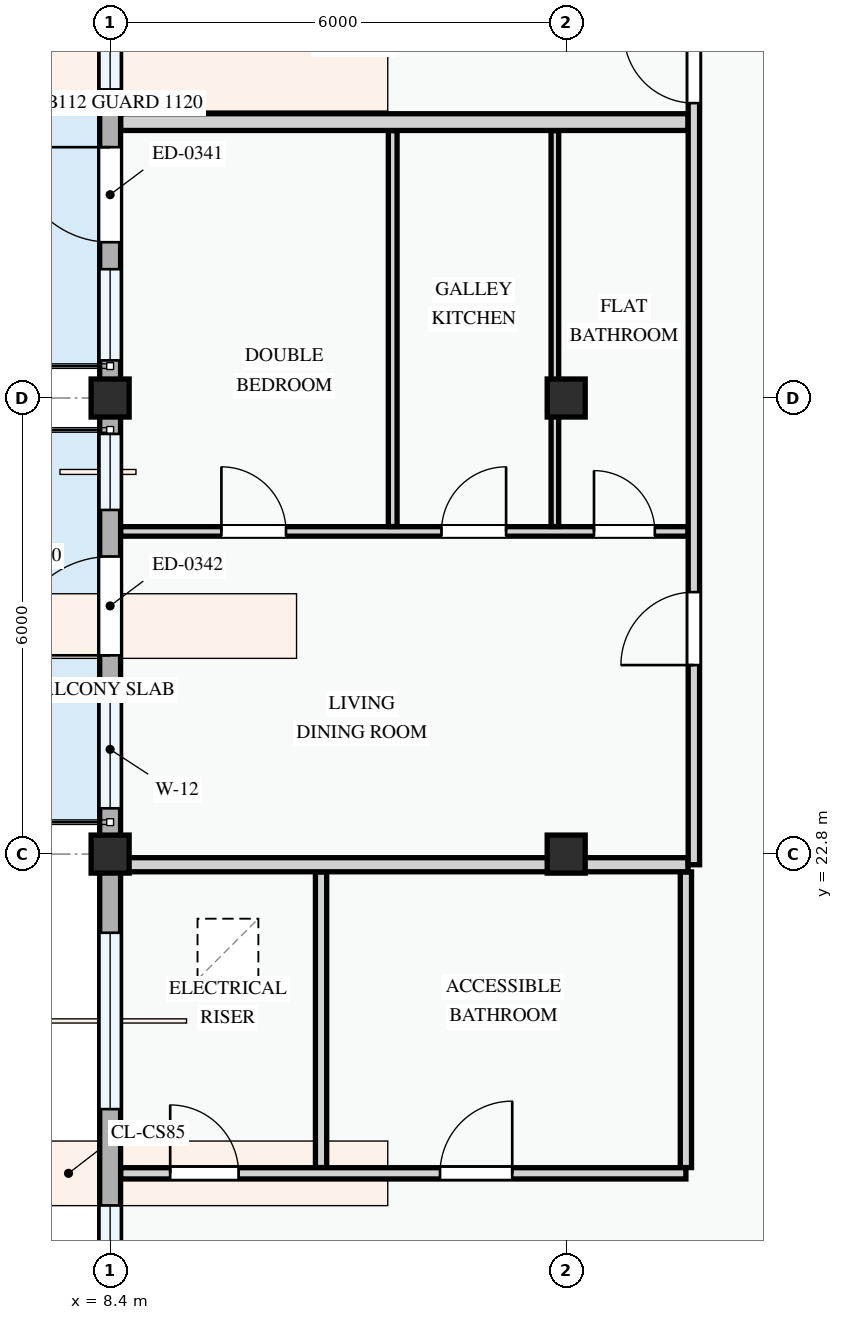
"""IFC4 building model, lengths in metres.
Left out: names, types, materials, properties, quantities, classifications, styles, units other than length and angle.
Written with IfcOpenShell. Run it as: python <this file> out.ifc"""

import sys

from ifc_helpers import new_model, si_unit, direction, frame, frame_2d, origin, origin_2d, place, context, subcontext, project, spatial, rectangle, extrude, element, fill, save


model = new_model("IFC4")
c1 = context("Model", 3, precision=1e-05, world=origin(), true_north=direction((0.0, 1.0)))
c2 = subcontext(c1, "Body", "Model", "MODEL_VIEW")
j1 = project(units=[si_unit("LENGTHUNIT", "METRE"), si_unit("PLANEANGLEUNIT", "RADIAN")], contexts=[c1])
p1 = place(None, origin())
s1 = spatial("IfcSite", under=j1, at=p1, CompositionType="ELEMENT")
p2 = place(p1, origin())
s2 = spatial("IfcBuilding", under=s1, at=p2, CompositionType="ELEMENT")
p3 = place(p2, frame((0.0, 0.0, 24.6)))
s3 = spatial("IfcBuildingStorey", under=s2, at=p3, CompositionType="ELEMENT", Elevation=24.6)
for number, where, z_axis, x_axis in (
    (1, (8.4, 22.8, 0.0), (0.0, 0.0, 1.0), (1.0, 0.0, 0.0)),
    (2, (8.4, 28.8, 0.0), (0.0, 0.0, 1.0), (1.0, 0.0, 0.0)),
    (3, (14.4, 22.8, 0.0), (0.0, 0.0, 1.0), (1.0, 0.0, 0.0)),
    (4, (14.4, 28.8, 0.0), (0.0, 0.0, 1.0), (1.0, 0.0, 0.0)),
):
    element("IfcColumn", number, at=place(p3, frame(where, z_axis=z_axis, x_axis=x_axis)), inside=s3, PredefinedType="COLUMN", context=c2, shape_type="SweptSolid", body=[
        extrude(rectangle(XDim=0.5, YDim=0.5, at=origin_2d()), origin(), (0.0, 0.0, 1.0), 3.3),
    ])
p4 = place(p3, frame((8.4, 37.2, 0.0), z_axis=(0.0, 0.0, 1.0), x_axis=(0.0, -1.0, 0.0)))
e5 = element("IfcWall", 5, at=p4, inside=s3, PredefinedType="STANDARD", context=c2, shape_type="SweptSolid", body=[
    extrude(rectangle(XDim=8.4, YDim=0.275, at=frame_2d((4.2, 0.0))), origin(), (0.0, 0.0, 1.0), 2.425),
])
p5 = place(p4, frame((5.1, 0.0, 0.0)))
e6 = element("IfcOpeningElement", 6, at=p5, cuts=e5, PredefinedType="OPENING", context=c2, shape_type="SweptSolid", body=[
    extrude(rectangle(XDim=1.25, YDim=2.2, at=frame_2d((0.625, 1.1))), frame((0.0, 0.147, 0.0), z_axis=(0.0, -1.0, 0.0), x_axis=(1.0, 0.0, 0.0)), (0.0, 0.0, 1.0), 0.295),
])
p6 = place(p4, frame((0.54, 0.0, 0.78)))
e7 = element("IfcOpeningElement", 7, at=p6, cuts=e5, PredefinedType="OPENING", context=c2, shape_type="SweptSolid", body=[
    extrude(rectangle(XDim=0.9, YDim=1.2, at=frame_2d((0.45, 0.6))), frame((0.0, 0.147, 0.0), z_axis=(0.0, -1.0, 0.0), x_axis=(1.0, 0.0, 0.0)), (0.0, 0.0, 1.0), 0.295),
])
p7 = place(p4, frame((2.22, 0.0, 0.78)))
e8 = element("IfcOpeningElement", 8, at=p7, cuts=e5, PredefinedType="OPENING", context=c2, shape_type="SweptSolid", body=[
    extrude(rectangle(XDim=2.12, YDim=1.44, at=frame_2d((1.06, 0.72))), frame((0.0, 0.147, 0.0), z_axis=(0.0, -1.0, 0.0), x_axis=(1.0, 0.0, 0.0)), (0.0, 0.0, 1.0), 0.295),
])
p8 = place(p4, frame((6.705, 0.0, 0.78)))
e9 = element("IfcOpeningElement", 9, at=p8, cuts=e5, PredefinedType="OPENING", context=c2, shape_type="SweptSolid", body=[
    extrude(rectangle(XDim=1.2, YDim=1.5, at=frame_2d((0.6, 0.75))), frame((0.0, 0.147, 0.0), z_axis=(0.0, -1.0, 0.0), x_axis=(1.0, 0.0, 0.0)), (0.0, 0.0, 1.0), 0.295),
])
p9 = place(p3, frame((8.4, 28.8, 0.0), z_axis=(0.0, 0.0, 1.0), x_axis=(0.0, -1.0, 0.0)))
e10 = element("IfcWall", 10, at=p9, inside=s3, PredefinedType="STANDARD", context=c2, shape_type="SweptSolid", body=[
    extrude(rectangle(XDim=6.0, YDim=0.275, at=frame_2d((3.0, 0.0))), origin(), (0.0, 0.0, 1.0), 2.575),
])
p10 = place(p9, frame((2.085, 0.0, 0.0)))
e11 = element("IfcOpeningElement", 11, at=p10, cuts=e10, PredefinedType="OPENING", context=c2, shape_type="SweptSolid", body=[
    extrude(rectangle(XDim=1.3, YDim=2.15, at=frame_2d((0.65, 1.075))), frame((0.0, 0.147, 0.0), z_axis=(0.0, -1.0, 0.0), x_axis=(1.0, 0.0, 0.0)), (0.0, 0.0, 1.0), 0.295),
])
p11 = place(p9, frame((0.472, 0.0, 0.78)))
e12 = element("IfcOpeningElement", 12, at=p11, cuts=e10, PredefinedType="OPENING", context=c2, shape_type="SweptSolid", body=[
    extrude(rectangle(XDim=1.0, YDim=1.25, at=frame_2d((0.5, 0.625))), frame((0.0, 0.147, 0.0), z_axis=(0.0, -1.0, 0.0), x_axis=(1.0, 0.0, 0.0)), (0.0, 0.0, 1.0), 0.295),
])
p12 = place(p9, frame((3.847, 0.0, 0.78)))
e13 = element("IfcOpeningElement", 13, at=p12, cuts=e10, PredefinedType="OPENING", context=c2, shape_type="SweptSolid", body=[
    extrude(rectangle(XDim=1.55, YDim=1.4, at=frame_2d((0.775, 0.7))), frame((0.0, 0.147, 0.0), z_axis=(0.0, -1.0, 0.0), x_axis=(1.0, 0.0, 0.0)), (0.0, 0.0, 1.0), 0.295),
])
p13 = place(p3, frame((8.4, 22.8, 0.0), z_axis=(0.0, 0.0, 1.0), x_axis=(0.0, -1.0, 0.0)))
e14 = element("IfcWall", 14, at=p13, inside=s3, PredefinedType="STANDARD", context=c2, shape_type="SweptSolid", body=[
    extrude(rectangle(XDim=8.4, YDim=0.275, at=frame_2d((4.2, 0.0))), origin(), (0.0, 0.0, 1.0), 2.425),
])
p14 = place(p13, frame((1.035, 0.0, 0.78)))
e15 = element("IfcOpeningElement", 15, at=p14, cuts=e14, PredefinedType="OPENING", context=c2, shape_type="SweptSolid", body=[
    extrude(rectangle(XDim=2.32, YDim=1.5, at=frame_2d((1.16, 0.75))), frame((0.0, 0.147, 0.0), z_axis=(0.0, -1.0, 0.0), x_axis=(1.0, 0.0, 0.0)), (0.0, 0.0, 1.0), 0.295),
])
p15 = place(p13, frame((4.623, 0.0, 0.78)))
e16 = element("IfcOpeningElement", 16, at=p15, cuts=e14, PredefinedType="OPENING", context=c2, shape_type="SweptSolid", body=[
    extrude(rectangle(XDim=2.08, YDim=1.52, at=frame_2d((1.04, 0.76))), frame((0.0, 0.147, 0.0), z_axis=(0.0, -1.0, 0.0), x_axis=(1.0, 0.0, 0.0)), (0.0, 0.0, 1.0), 0.295),
])
for number, where, z_axis, x_axis in (
    (17, (11.175, 18.676, 0.0), (0.0, 0.0, 1.0), (0.0, 1.0, 0.0)),
    (18, (15.975, 18.676, 0.0), (0.0, 0.0, 1.0), (0.0, 1.0, 0.0)),
):
    element("IfcWall", number, at=place(p3, frame(where, z_axis=z_axis, x_axis=x_axis)), inside=s3, PredefinedType="PARTITIONING", context=c2, shape_type="SweptSolid", body=[
        extrude(rectangle(XDim=3.889, YDim=0.148, at=frame_2d((1.945, 0.0))), origin(), (0.0, 0.0, 1.0), 3.0),
    ])
p16 = place(p3, frame((8.54, 18.6, 0.0), z_axis=(0.0, 0.0, 1.0), x_axis=(1.0, 0.0, 0.0)))
e19 = element("IfcWall", 19, at=p16, inside=s3, PredefinedType="PARTITIONING", context=c2, shape_type="SweptSolid", body=[
    extrude(rectangle(XDim=7.435, YDim=0.148, at=frame_2d((3.718, 0.0))), origin(), (0.0, 0.0, 1.0), 3.0),
])
p17 = place(p16, frame((0.65, 0.0, 0.0)))
e20 = element("IfcOpeningElement", 20, at=p17, cuts=e19, PredefinedType="OPENING", context=c2, shape_type="SweptSolid", body=[
    extrude(rectangle(XDim=0.9, YDim=2.1, at=frame_2d((0.45, 1.05))), frame((0.0, 0.084, 0.0), z_axis=(0.0, -1.0, 0.0), x_axis=(1.0, 0.0, 0.0)), (0.0, 0.0, 1.0), 0.168),
])
p18 = place(p16, frame((4.2, 0.0, 0.0)))
e21 = element("IfcOpeningElement", 21, at=p18, cuts=e19, PredefinedType="OPENING", context=c2, shape_type="SweptSolid", body=[
    extrude(rectangle(XDim=0.95, YDim=2.1, at=frame_2d((0.475, 1.05))), frame((0.0, 0.084, 0.0), z_axis=(0.0, -1.0, 0.0), x_axis=(1.0, 0.0, 0.0)), (0.0, 0.0, 1.0), 0.168),
])
p19 = place(p3, frame((8.54, 27.045, 0.0), z_axis=(0.0, 0.0, 1.0), x_axis=(1.0, 0.0, 0.0)))
e22 = element("IfcWall", 22, at=p19, inside=s3, PredefinedType="PARTITIONING", context=c2, shape_type="SweptSolid", body=[
    extrude(rectangle(XDim=7.463, YDim=0.125, at=frame_2d((3.732, 0.0))), origin(), (0.0, 0.0, 1.0), 3.0),
])
p20 = place(p19, frame((1.324, 0.0, 0.0)))
e23 = element("IfcOpeningElement", 23, at=p20, cuts=e22, PredefinedType="OPENING", context=c2, shape_type="SweptSolid", body=[
    extrude(rectangle(XDim=0.85, YDim=2.1, at=frame_2d((0.425, 1.05))), frame((0.0, 0.073, 0.0), z_axis=(0.0, -1.0, 0.0), x_axis=(1.0, 0.0, 0.0)), (0.0, 0.0, 1.0), 0.145),
])
p21 = place(p19, frame((4.22, 0.0, 0.0)))
e24 = element("IfcOpeningElement", 24, at=p21, cuts=e22, PredefinedType="OPENING", context=c2, shape_type="SweptSolid", body=[
    extrude(rectangle(XDim=0.85, YDim=2.1, at=frame_2d((0.425, 1.05))), frame((0.0, 0.073, 0.0), z_axis=(0.0, -1.0, 0.0), x_axis=(1.0, 0.0, 0.0)), (0.0, 0.0, 1.0), 0.145),
])
p22 = place(p19, frame((6.226, 0.0, 0.0)))
e25 = element("IfcOpeningElement", 25, at=p22, cuts=e22, PredefinedType="OPENING", context=c2, shape_type="SweptSolid", body=[
    extrude(rectangle(XDim=0.8, YDim=2.1, at=frame_2d((0.4, 1.05))), frame((0.0, 0.073, 0.0), z_axis=(0.0, -1.0, 0.0), x_axis=(1.0, 0.0, 0.0)), (0.0, 0.0, 1.0), 0.145),
])
p23 = place(p3, frame((12.118, 27.11, 0.0), z_axis=(0.0, 0.0, 1.0), x_axis=(0.0, 1.0, 0.0)))
e26 = element("IfcWall", 26, at=p23, inside=s3, PredefinedType="PARTITIONING", context=c2, shape_type="SweptSolid", body=[
    extrude(rectangle(XDim=5.208, YDim=0.115, at=frame_2d((2.604, 0.0))), origin(), (0.0, 0.0, 1.0), 3.0),
])
p24 = place(p3, frame((14.251, 27.11, 0.0), z_axis=(0.0, 0.0, 1.0), x_axis=(0.0, 1.0, 0.0)))
e27 = element("IfcWall", 27, at=p24, inside=s3, PredefinedType="PARTITIONING", context=c2, shape_type="SweptSolid", body=[
    extrude(rectangle(XDim=5.208, YDim=0.1, at=frame_2d((2.604, 0.0))), origin(), (0.0, 0.0, 1.0), 2.425),
])
p25 = place(p3, frame((8.54, 22.66, 0.0), z_axis=(0.0, 0.0, 1.0), x_axis=(1.0, 0.0, 0.0)))
e28 = element("IfcWall", 28, at=p25, inside=s3, PredefinedType="PARTITIONING", context=c2, shape_type="SweptSolid", body=[
    extrude(rectangle(XDim=7.463, YDim=0.185, at=frame_2d((3.732, 0.0))), origin(), (0.0, 0.0, 1.0), 2.375),
])
p26 = place(p3, frame((8.54, 32.43, 0.0), z_axis=(0.0, 0.0, 1.0), x_axis=(1.0, 0.0, 0.0)))
e29 = element("IfcWall", 29, at=p26, inside=s3, PredefinedType="PARTITIONING", context=c2, shape_type="SweptSolid", body=[
    extrude(rectangle(XDim=7.463, YDim=0.22, at=frame_2d((3.732, 0.0))), origin(), (0.0, 0.0, 1.0), 3.0),
])
p27 = place(p3, frame((16.08, 22.66, 0.0), z_axis=(0.0, 0.0, 1.0), x_axis=(0.0, 1.0, 0.0)))
e30 = element("IfcWall", 30, at=p27, inside=s3, PredefinedType="PARTITIONING", context=c2, shape_type="SweptSolid", body=[
    extrude(rectangle(XDim=34.801, YDim=0.15, at=frame_2d((17.4, 0.0))), origin(), (0.0, 0.0, 1.0), 3.0),
])
p28 = place(p27, frame((2.627, 0.0, 0.0)))
e31 = element("IfcOpeningElement", 31, at=p28, cuts=e30, PredefinedType="OPENING", context=c2, shape_type="SweptSolid", body=[
    extrude(rectangle(XDim=0.96, YDim=2.12, at=frame_2d((0.48, 1.06))), frame((0.0, 0.085, 0.0), z_axis=(0.0, -1.0, 0.0), x_axis=(1.0, 0.0, 0.0)), (0.0, 0.0, 1.0), 0.17),
])
p29 = place(p27, frame((10.02, 0.0, 0.0)))
e32 = element("IfcOpeningElement", 32, at=p29, cuts=e30, PredefinedType="OPENING", context=c2, shape_type="SweptSolid", body=[
    extrude(rectangle(XDim=0.92, YDim=2.1, at=frame_2d((0.46, 1.05))), frame((0.0, 0.085, 0.0), z_axis=(0.0, -1.0, 0.0), x_axis=(1.0, 0.0, 0.0)), (0.0, 0.0, 1.0), 0.17),
])
p30 = place(p27, frame((24.355, 0.0, 0.0)))
e33 = element("IfcOpeningElement", 33, at=p30, cuts=e30, PredefinedType="OPENING", context=c2, shape_type="SweptSolid", body=[
    extrude(rectangle(XDim=0.92, YDim=2.1, at=frame_2d((0.46, 1.05))), frame((0.0, 0.085, 0.0), z_axis=(0.0, -1.0, 0.0), x_axis=(1.0, 0.0, 0.0)), (0.0, 0.0, 1.0), 0.17),
])
p31 = place(p5, frame((1.25, 0.0, 0.0), z_axis=(0.0, 0.0, 1.0), x_axis=(-1.0, 0.0, 0.0)))
e34 = element("IfcDoor", 34, at=p31, inside=s3, OperationType="SINGLE_SWING_RIGHT", PredefinedType="DOOR", context=c2, shape_type="SweptSolid", body=[
    extrude(rectangle(XDim=1.25, YDim=2.2, at=frame_2d((0.625, 1.1))), frame((0.0, 0.025, 0.0), z_axis=(0.0, -1.0, 0.0), x_axis=(1.0, 0.0, 0.0)), (0.0, 0.0, 1.0), 0.05),
])
fill(e6, e34)
p32 = place(p7, origin())
e35 = element("IfcWindow", 35, at=p32, inside=s3, PartitioningType="DOUBLE_PANEL_VERTICAL", PredefinedType="WINDOW", context=c2, shape_type="SweptSolid", body=[
    extrude(rectangle(XDim=2.12, YDim=1.44, at=frame_2d((1.06, 0.72))), frame((0.0, 0.03, 0.0), z_axis=(0.0, -1.0, 0.0), x_axis=(1.0, 0.0, 0.0)), (0.0, 0.0, 1.0), 0.06),
])
fill(e8, e35)
p33 = place(p8, origin())
e36 = element("IfcWindow", 36, at=p33, inside=s3, PartitioningType="SINGLE_PANEL", PredefinedType="WINDOW", context=c2, shape_type="SweptSolid", body=[
    extrude(rectangle(XDim=1.2, YDim=1.5, at=frame_2d((0.6, 0.75))), frame((0.0, 0.03, 0.0), z_axis=(0.0, -1.0, 0.0), x_axis=(1.0, 0.0, 0.0)), (0.0, 0.0, 1.0), 0.06),
])
fill(e9, e36)
p34 = place(p10, frame((1.3, 0.0, 0.0), z_axis=(0.0, 0.0, 1.0), x_axis=(-1.0, 0.0, 0.0)))
e37 = element("IfcDoor", 37, at=p34, inside=s3, OperationType="SINGLE_SWING_LEFT", PredefinedType="DOOR", context=c2, shape_type="SweptSolid", body=[
    extrude(rectangle(XDim=1.3, YDim=2.15, at=frame_2d((0.65, 1.075))), frame((0.0, 0.025, 0.0), z_axis=(0.0, -1.0, 0.0), x_axis=(1.0, 0.0, 0.0)), (0.0, 0.0, 1.0), 0.05),
])
fill(e11, e37)
p35 = place(p11, origin())
e38 = element("IfcWindow", 38, at=p35, inside=s3, PartitioningType="SINGLE_PANEL", PredefinedType="WINDOW", context=c2, shape_type="SweptSolid", body=[
    extrude(rectangle(XDim=1.0, YDim=1.25, at=frame_2d((0.5, 0.625))), frame((0.0, 0.03, 0.0), z_axis=(0.0, -1.0, 0.0), x_axis=(1.0, 0.0, 0.0)), (0.0, 0.0, 1.0), 0.06),
])
fill(e12, e38)
p36 = place(p12, origin())
e39 = element("IfcWindow", 39, at=p36, inside=s3, PartitioningType="SINGLE_PANEL", PredefinedType="WINDOW", context=c2, shape_type="SweptSolid", body=[
    extrude(rectangle(XDim=1.55, YDim=1.4, at=frame_2d((0.775, 0.7))), frame((0.0, 0.03, 0.0), z_axis=(0.0, -1.0, 0.0), x_axis=(1.0, 0.0, 0.0)), (0.0, 0.0, 1.0), 0.06),
])
fill(e13, e39)
p37 = place(p14, origin())
e40 = element("IfcWindow", 40, at=p37, inside=s3, PartitioningType="DOUBLE_PANEL_VERTICAL", PredefinedType="WINDOW", context=c2, shape_type="SweptSolid", body=[
    extrude(rectangle(XDim=2.32, YDim=1.5, at=frame_2d((1.16, 0.75))), frame((0.0, 0.03, 0.0), z_axis=(0.0, -1.0, 0.0), x_axis=(1.0, 0.0, 0.0)), (0.0, 0.0, 1.0), 0.06),
])
fill(e15, e40)
p38 = place(p15, origin())
e41 = element("IfcWindow", 41, at=p38, inside=s3, PartitioningType="DOUBLE_PANEL_VERTICAL", PredefinedType="WINDOW", context=c2, shape_type="SweptSolid", body=[
    extrude(rectangle(XDim=2.08, YDim=1.52, at=frame_2d((1.04, 0.76))), frame((0.0, 0.03, 0.0), z_axis=(0.0, -1.0, 0.0), x_axis=(1.0, 0.0, 0.0)), (0.0, 0.0, 1.0), 0.06),
])
fill(e16, e41)
p39 = place(p17, origin())
e42 = element("IfcDoor", 42, at=p39, inside=s3, OperationType="SINGLE_SWING_LEFT", PredefinedType="DOOR", context=c2, shape_type="SweptSolid", body=[
    extrude(rectangle(XDim=0.9, YDim=2.1, at=frame_2d((0.45, 1.05))), frame((0.0, 0.025, 0.0), z_axis=(0.0, -1.0, 0.0), x_axis=(1.0, 0.0, 0.0)), (0.0, 0.0, 1.0), 0.05),
])
fill(e20, e42)
p40 = place(p18, origin())
e43 = element("IfcDoor", 43, at=p40, inside=s3, OperationType="SINGLE_SWING_RIGHT", PredefinedType="DOOR", context=c2, shape_type="SweptSolid", body=[
    extrude(rectangle(XDim=0.95, YDim=2.1, at=frame_2d((0.475, 1.05))), frame((0.0, 0.025, 0.0), z_axis=(0.0, -1.0, 0.0), x_axis=(1.0, 0.0, 0.0)), (0.0, 0.0, 1.0), 0.05),
])
fill(e21, e43)
p41 = place(p20, origin())
e44 = element("IfcDoor", 44, at=p41, inside=s3, OperationType="SINGLE_SWING_LEFT", PredefinedType="DOOR", context=c2, shape_type="SweptSolid", body=[
    extrude(rectangle(XDim=0.85, YDim=2.1, at=frame_2d((0.425, 1.05))), frame((0.0, 0.025, 0.0), z_axis=(0.0, -1.0, 0.0), x_axis=(1.0, 0.0, 0.0)), (0.0, 0.0, 1.0), 0.05),
])
fill(e23, e44)
p42 = place(p21, origin())
e45 = element("IfcDoor", 45, at=p42, inside=s3, OperationType="SINGLE_SWING_RIGHT", PredefinedType="DOOR", context=c2, shape_type="SweptSolid", body=[
    extrude(rectangle(XDim=0.85, YDim=2.1, at=frame_2d((0.425, 1.05))), frame((0.0, 0.025, 0.0), z_axis=(0.0, -1.0, 0.0), x_axis=(1.0, 0.0, 0.0)), (0.0, 0.0, 1.0), 0.05),
])
fill(e24, e45)
p43 = place(p22, origin())
e46 = element("IfcDoor", 46, at=p43, inside=s3, OperationType="SINGLE_SWING_LEFT", PredefinedType="DOOR", context=c2, shape_type="SweptSolid", body=[
    extrude(rectangle(XDim=0.8, YDim=2.1, at=frame_2d((0.4, 1.05))), frame((0.0, 0.025, 0.0), z_axis=(0.0, -1.0, 0.0), x_axis=(1.0, 0.0, 0.0)), (0.0, 0.0, 1.0), 0.05),
])
fill(e25, e46)
p44 = place(p28, origin())
e47 = element("IfcDoor", 47, at=p44, inside=s3, OperationType="SINGLE_SWING_LEFT", PredefinedType="DOOR", context=c2, shape_type="SweptSolid", body=[
    extrude(rectangle(XDim=0.96, YDim=2.12, at=frame_2d((0.48, 1.06))), frame((0.0, 0.025, 0.0), z_axis=(0.0, -1.0, 0.0), x_axis=(1.0, 0.0, 0.0)), (0.0, 0.0, 1.0), 0.05),
])
fill(e31, e47)
p45 = place(p29, origin())
e48 = element("IfcDoor", 48, at=p45, inside=s3, OperationType="SINGLE_SWING_RIGHT", PredefinedType="DOOR", context=c2, shape_type="SweptSolid", body=[
    extrude(rectangle(XDim=0.92, YDim=2.1, at=frame_2d((0.46, 1.05))), frame((0.0, 0.025, 0.0), z_axis=(0.0, -1.0, 0.0), x_axis=(1.0, 0.0, 0.0)), (0.0, 0.0, 1.0), 0.05),
])
fill(e32, e48)
save(model, sys.argv[1])
